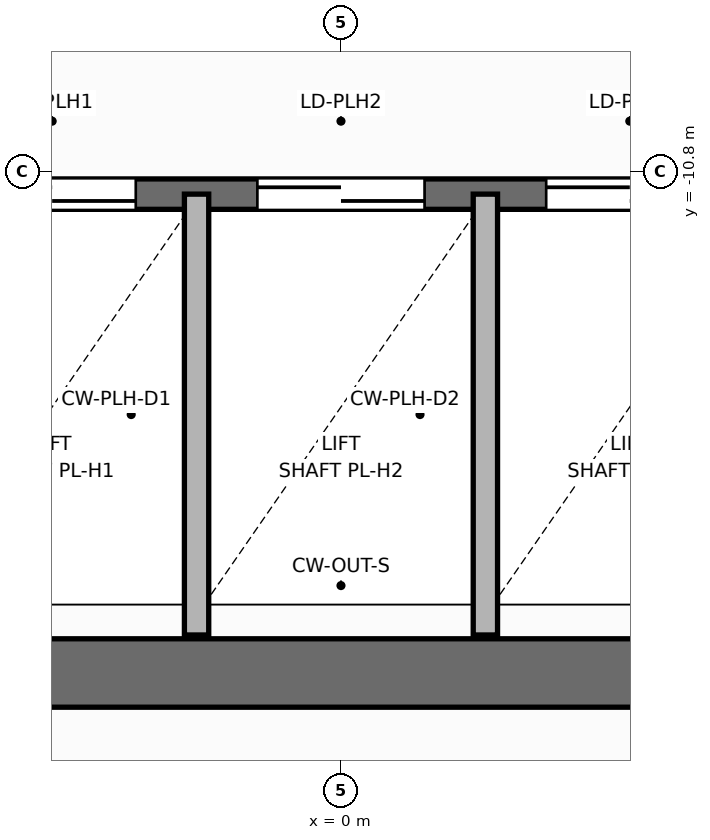
"""IFC4 building model, lengths in metres.
Left out: names, types, materials, properties, quantities, classifications, styles, units other than length and angle.
Written with IfcOpenShell. Run it as: python <this file> out.ifc"""

import sys

from ifc_helpers import new_model, si_unit, direction, frame, frame_2d, origin, place, context, subcontext, project, spatial, rectangle, extrude, element, fill, save


model = new_model("IFC4")
c1 = context("Model", 3, precision=1e-05, world=origin(), true_north=direction((0.0, 1.0)))
c2 = subcontext(c1, "Body", "Model", "MODEL_VIEW")
j1 = project(units=[si_unit("LENGTHUNIT", "METRE"), si_unit("PLANEANGLEUNIT", "RADIAN")], contexts=[c1])
p1 = place(None, origin())
s1 = spatial("IfcSite", under=j1, at=p1, CompositionType="ELEMENT")
p2 = place(p1, origin())
s2 = spatial("IfcBuilding", under=s1, at=p2, CompositionType="ELEMENT")
p3 = place(p2, frame((0.0, 0.0, 106.8)))
s3 = spatial("IfcBuildingStorey", under=s2, at=p3, CompositionType="ELEMENT", Elevation=106.8)
p4 = place(p3, frame((-12.65, -14.1, 0.0), z_axis=(0.0, 0.0, 1.0), x_axis=(1.0, 0.0, 0.0)))
e1 = element("IfcWall", 1, at=p4, inside=s3, PredefinedType="SHEAR", context=c2, shape_type="SweptSolid", body=[
    extrude(rectangle(XDim=25.3, YDim=0.45, at=frame_2d((12.65, 0.0))), origin(), (0.0, 0.0, 1.0), 3.6),
])
p5 = place(p3, frame((-5.12, -10.95, 0.0), z_axis=(0.0, 0.0, 1.0), x_axis=(1.0, 0.0, 0.0)))
e2 = element("IfcWall", 2, at=p5, inside=s3, PredefinedType="SOLIDWALL", context=c2, shape_type="SweptSolid", body=[
    extrude(rectangle(XDim=10.24, YDim=0.2, at=frame_2d((5.12, 0.0))), origin(), (0.0, 0.0, 1.0), 3.6),
])
p6 = place(p5, frame((0.6, 0.0, 0.0)))
e3 = element("IfcOpeningElement", 3, at=p6, cuts=e2, PredefinedType="OPENING", context=c2, shape_type="SweptSolid", body=[
    extrude(rectangle(XDim=1.106, YDim=2.104, at=frame_2d((0.55, 1.052))), frame((0.0, 0.11, 0.0), z_axis=(0.0, -1.0, 0.0), x_axis=(1.0, 0.0, 0.0)), (0.0, 0.0, 1.0), 0.22),
])
p7 = place(p5, frame((2.67, 0.0, 0.0)))
e4 = element("IfcOpeningElement", 4, at=p7, cuts=e2, PredefinedType="OPENING", context=c2, shape_type="SweptSolid", body=[
    extrude(rectangle(XDim=1.106, YDim=2.104, at=frame_2d((0.55, 1.052))), frame((0.0, 0.11, 0.0), z_axis=(0.0, -1.0, 0.0), x_axis=(1.0, 0.0, 0.0)), (0.0, 0.0, 1.0), 0.22),
])
p8 = place(p5, frame((4.57, 0.0, 0.0)))
e5 = element("IfcOpeningElement", 5, at=p8, cuts=e2, PredefinedType="OPENING", context=c2, shape_type="SweptSolid", body=[
    extrude(rectangle(XDim=1.106, YDim=2.104, at=frame_2d((0.55, 1.052))), frame((0.0, 0.11, 0.0), z_axis=(0.0, -1.0, 0.0), x_axis=(1.0, 0.0, 0.0)), (0.0, 0.0, 1.0), 0.22),
])
p9 = place(p5, frame((6.47, 0.0, 0.0)))
e6 = element("IfcOpeningElement", 6, at=p9, cuts=e2, PredefinedType="OPENING", context=c2, shape_type="SweptSolid", body=[
    extrude(rectangle(XDim=1.106, YDim=2.104, at=frame_2d((0.55, 1.052))), frame((0.0, 0.11, 0.0), z_axis=(0.0, -1.0, 0.0), x_axis=(1.0, 0.0, 0.0)), (0.0, 0.0, 1.0), 0.22),
])
p10 = place(p5, frame((8.54, 0.0, 0.0)))
e7 = element("IfcOpeningElement", 7, at=p10, cuts=e2, PredefinedType="OPENING", context=c2, shape_type="SweptSolid", body=[
    extrude(rectangle(XDim=1.106, YDim=2.104, at=frame_2d((0.55, 1.052))), frame((0.0, 0.11, 0.0), z_axis=(0.0, -1.0, 0.0), x_axis=(1.0, 0.0, 0.0)), (0.0, 0.0, 1.0), 0.22),
])
for number, where, z_axis, x_axis in (
    (8, (-0.95, -13.85, 0.0), (0.0, 0.0, 1.0), (0.0, 1.0, 0.0)),
    (9, (0.95, -13.85, 0.0), (0.0, 0.0, 1.0), (0.0, 1.0, 0.0)),
):
    element("IfcWall", number, at=place(p3, frame(where, z_axis=z_axis, x_axis=x_axis)), inside=s3, PredefinedType="PARTITIONING", context=c2, shape_type="SweptSolid", body=[
        extrude(rectangle(XDim=2.9, YDim=0.16, at=frame_2d((1.45, 0.0))), origin(), (0.0, 0.0, 1.0), 2.375),
    ])
p11 = place(p7, origin())
e10 = element("IfcDoor", 10, at=p11, inside=s3, OperationType="DOUBLE_DOOR_SLIDING", PredefinedType="DOOR", context=c2, shape_type="SweptSolid", body=[
    extrude(rectangle(XDim=1.1, YDim=2.1, at=frame_2d((0.55, 1.05))), frame((0.0, 0.025, 0.0), z_axis=(0.0, -1.0, 0.0), x_axis=(1.0, 0.0, 0.0)), (0.0, 0.0, 1.0), 0.05),
])
fill(e4, e10)
p12 = place(p8, origin())
e11 = element("IfcDoor", 11, at=p12, inside=s3, OperationType="DOUBLE_DOOR_SLIDING", PredefinedType="DOOR", context=c2, shape_type="SweptSolid", body=[
    extrude(rectangle(XDim=1.1, YDim=2.1, at=frame_2d((0.55, 1.05))), frame((0.0, 0.025, 0.0), z_axis=(0.0, -1.0, 0.0), x_axis=(1.0, 0.0, 0.0)), (0.0, 0.0, 1.0), 0.05),
])
fill(e5, e11)
p13 = place(p9, origin())
e12 = element("IfcDoor", 12, at=p13, inside=s3, OperationType="DOUBLE_DOOR_SLIDING", PredefinedType="DOOR", context=c2, shape_type="SweptSolid", body=[
    extrude(rectangle(XDim=1.1, YDim=2.1, at=frame_2d((0.55, 1.05))), frame((0.0, 0.025, 0.0), z_axis=(0.0, -1.0, 0.0), x_axis=(1.0, 0.0, 0.0)), (0.0, 0.0, 1.0), 0.05),
])
fill(e6, e12)
save(model, sys.argv[1])
